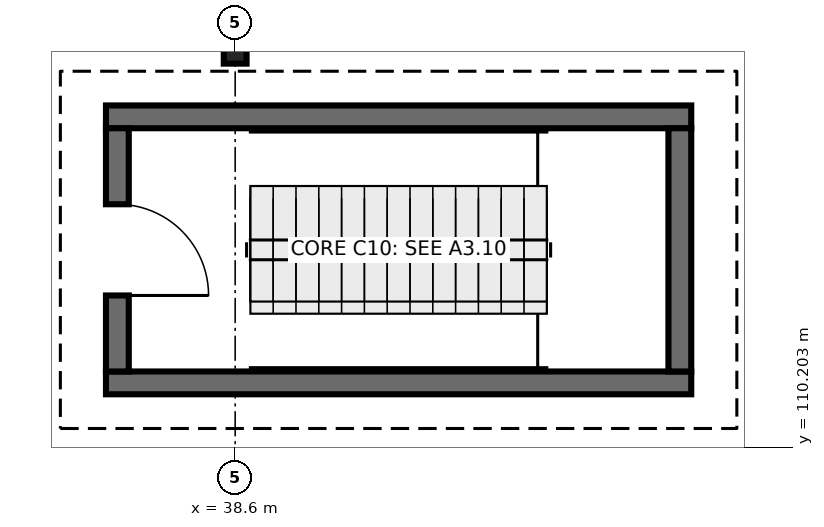
"""IFC4 building model, lengths in metres.
Left out: names, types, materials, properties, quantities, classifications, styles, units other than length and angle.
Written with IfcOpenShell. Run it as: python <this file> out.ifc"""

import sys

from ifc_helpers import new_model, si_unit, direction, frame, frame_2d, origin, origin_2d, place, context, subcontext, project, spatial, rectangle, i_section, extrude, element, fill, save


model = new_model("IFC4")
c1 = context("Model", 3, precision=1e-05, world=origin(), true_north=direction((0.0, 1.0)))
c2 = subcontext(c1, "Body", "Model", "MODEL_VIEW")
j1 = project(units=[si_unit("LENGTHUNIT", "METRE"), si_unit("PLANEANGLEUNIT", "RADIAN")], contexts=[c1])
p1 = place(None, origin())
s1 = spatial("IfcSite", under=j1, at=p1, CompositionType="ELEMENT")
p2 = place(p1, origin())
s2 = spatial("IfcBuilding", under=s1, at=p2, CompositionType="ELEMENT")
p3 = place(p2, frame((0.0, 0.0, -5.0)))
s3 = spatial("IfcBuildingStorey", under=s2, at=p3, CompositionType="ELEMENT", Elevation=-5.0)
p4 = place(p3, frame((38.6, 115.5, 0.0), z_axis=(0.0, 0.0, 1.0), x_axis=(1.0, 0.0, 0.0)))
e1 = element("IfcColumn", 1, at=p4, inside=s3, PredefinedType="COLUMN", context=c2, shape_type="SweptSolid", body=[
    extrude(i_section(OverallWidth=0.3, OverallDepth=0.5, WebThickness=0.014, FlangeThickness=0.028, FilletRadius=0.027, at=origin_2d()), origin(), (0.0, 0.0, 1.0), 5.0),
])
for number, where, z_axis, x_axis in (
    (2, (36.9, 111.05, 0.0), (0.0, 0.0, 1.0), (1.0, 0.0, 0.0)),
    (3, (44.6, 114.55, 0.0), (0.0, 0.0, 1.0), (-1.0, 0.0, 0.0)),
):
    element("IfcWall", number, at=place(p3, frame(where, z_axis=z_axis, x_axis=x_axis)), inside=s3, PredefinedType="SHEAR", context=c2, shape_type="SweptSolid", body=[
        extrude(rectangle(XDim=7.7, YDim=0.3, at=frame_2d((3.85, 0.0))), origin(), (0.0, 0.0, 1.0), 5.0),
    ])
p5 = place(p3, frame((37.05, 114.4, 0.0), z_axis=(0.0, 0.0, 1.0), x_axis=(0.0, -1.0, 0.0)))
e4 = element("IfcWall", 4, at=p5, inside=s3, PredefinedType="SHEAR", context=c2, shape_type="SweptSolid", body=[
    extrude(rectangle(XDim=3.2, YDim=0.3, at=frame_2d((1.6, 0.0))), origin(), (0.0, 0.0, 1.0), 5.0),
])
p6 = place(p5, frame((1.0, 0.0, 0.0)))
e5 = element("IfcOpeningElement", 5, at=p6, cuts=e4, PredefinedType="OPENING", context=c2, shape_type="SweptSolid", body=[
    extrude(rectangle(XDim=1.2, YDim=2.15, at=frame_2d((0.6, 1.075))), frame((0.0, 0.16, 0.0), z_axis=(0.0, -1.0, 0.0), x_axis=(1.0, 0.0, 0.0)), (0.0, 0.0, 1.0), 0.32),
])
p7 = place(p3, frame((44.45, 111.2, 0.0), z_axis=(0.0, 0.0, 1.0), x_axis=(0.0, 1.0, 0.0)))
e6 = element("IfcWall", 6, at=p7, inside=s3, PredefinedType="SHEAR", context=c2, shape_type="SweptSolid", body=[
    extrude(rectangle(XDim=3.2, YDim=0.3, at=frame_2d((1.6, 0.0))), origin(), (0.0, 0.0, 1.0), 5.0),
])
p8 = place(p6, origin())
e7 = element("IfcDoor", 7, at=p8, inside=s3, OperationType="SINGLE_SWING_RIGHT", PredefinedType="DOOR", context=c2, shape_type="SweptSolid", body=[
    extrude(rectangle(XDim=1.2, YDim=2.15, at=frame_2d((0.6, 1.075))), frame((0.0, 0.025, 0.0), z_axis=(0.0, -1.0, 0.0), x_axis=(1.0, 0.0, 0.0)), (0.0, 0.0, 1.0), 0.05),
])
fill(e5, e7)
save(model, sys.argv[1])
